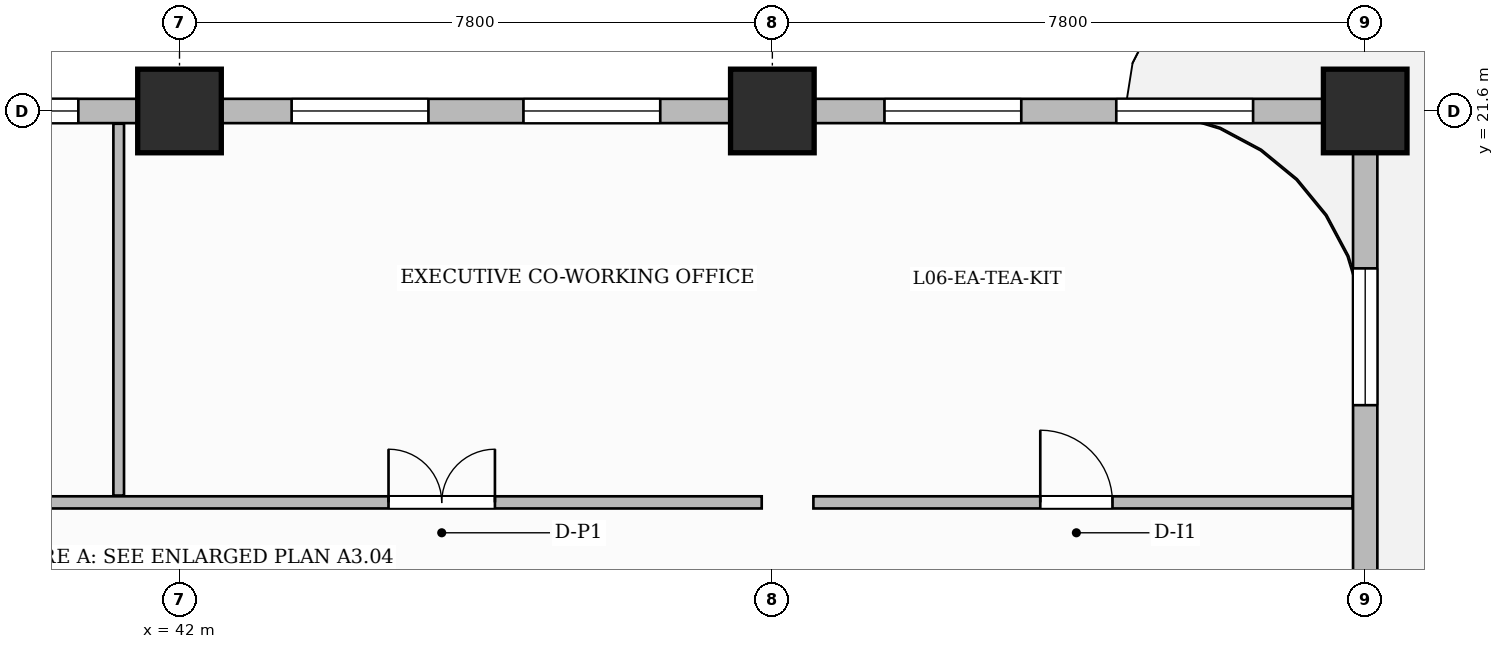
"""IFC4 building model, lengths in metres.
Left out: names, types, materials, properties, quantities, classifications, styles, units other than length and angle.
Written with IfcOpenShell. Run it as: python <this file> out.ifc"""

import sys

from ifc_helpers import new_model, si_unit, direction, frame, frame_2d, origin, origin_2d, place, context, subcontext, project, spatial, rectangle, extrude, source, transform, mapped, element, fill, save


model = new_model("IFC4")
c1 = context("Model", 3, precision=1e-05, world=origin(), true_north=direction((0.0, 1.0)))
c2 = subcontext(c1, "Body", "Model", "MODEL_VIEW")
j1 = project(units=[si_unit("LENGTHUNIT", "METRE"), si_unit("PLANEANGLEUNIT", "RADIAN")], contexts=[c1])
p1 = place(None, origin())
s1 = spatial("IfcSite", under=j1, at=p1, CompositionType="ELEMENT")
p2 = place(p1, origin())
s2 = spatial("IfcBuilding", under=s1, at=p2, CompositionType="ELEMENT")
p3 = place(p2, frame((0.0, 0.0, 32.4)))
s3 = spatial("IfcBuildingStorey", under=s2, at=p3, CompositionType="ELEMENT", Elevation=32.4)
m1 = source(origin(), c2, "Body", "SweptSolid", [
    extrude(rectangle(XDim=1.1, YDim=1.1, at=origin_2d()), origin(), (0.0, 0.0, 1.0), 3.7),
])
for number, where, z_axis, x_axis in (
    (1, (42.0, 21.6, 0.0), (0.0, 0.0, 1.0), (1.0, 0.0, 0.0)),
    (2, (49.8, 21.6, 0.0), (0.0, 0.0, 1.0), (1.0, 0.0, 0.0)),
    (3, (57.6, 21.6, 0.0), (0.0, 0.0, 1.0), (1.0, 0.0, 0.0)),
):
    element("IfcColumn", number, at=place(p3, frame(where, z_axis=z_axis, x_axis=x_axis)), inside=s3, PredefinedType="COLUMN", context=c2, shape_type="MappedRepresentation", body=[
        mapped(m1, transform((0.0, 0.0, 0.0), scale=1.0)),
    ])
p4 = place(p3, frame((30.29, 16.45, 0.0), z_axis=(0.0, 0.0, 1.0), x_axis=(1.0, 0.0, 0.0)))
e4 = element("IfcWall", 4, at=p4, inside=s3, PredefinedType="PARTITIONING", context=c2, shape_type="SweptSolid", body=[
    extrude(rectangle(XDim=19.37, YDim=0.16, at=frame_2d((9.685, 0.0))), origin(), (0.0, 0.0, 1.0), 3.45),
])
p5 = place(p4, frame((1.185, 0.0, 0.0)))
e5 = element("IfcOpeningElement", 5, at=p5, cuts=e4, PredefinedType="OPENING", context=c2, shape_type="SweptSolid", body=[
    extrude(rectangle(XDim=0.85, YDim=2.1, at=frame_2d((0.425, 1.05))), frame((0.0, 0.09, 0.0), z_axis=(0.0, -1.0, 0.0), x_axis=(1.0, 0.0, 0.0)), (0.0, 0.0, 1.0), 0.18),
])
p6 = place(p4, frame((6.66, 0.0, 0.0)))
e6 = element("IfcOpeningElement", 6, at=p6, cuts=e4, PredefinedType="OPENING", context=c2, shape_type="SweptSolid", body=[
    extrude(rectangle(XDim=0.9, YDim=2.15, at=frame_2d((0.45, 1.075))), frame((0.0, 0.09, 0.0), z_axis=(0.0, -1.0, 0.0), x_axis=(1.0, 0.0, 0.0)), (0.0, 0.0, 1.0), 0.18),
])
p7 = place(p4, frame((14.46, 0.0, 0.0)))
e7 = element("IfcOpeningElement", 7, at=p7, cuts=e4, PredefinedType="OPENING", context=c2, shape_type="SweptSolid", body=[
    extrude(rectangle(XDim=1.4, YDim=2.35, at=frame_2d((0.7, 1.175))), frame((0.0, 0.09, 0.0), z_axis=(0.0, -1.0, 0.0), x_axis=(1.0, 0.0, 0.0)), (0.0, 0.0, 1.0), 0.18),
])
p8 = place(p3, frame((50.34, 16.45, 0.0), z_axis=(0.0, 0.0, 1.0), x_axis=(1.0, 0.0, 0.0)))
e8 = element("IfcWall", 8, at=p8, inside=s3, PredefinedType="PARTITIONING", context=c2, shape_type="SweptSolid", body=[
    extrude(rectangle(XDim=7.092, YDim=0.16, at=frame_2d((3.546, 0.0))), origin(), (0.0, 0.0, 1.0), 3.45),
])
p9 = place(p8, frame((2.985, 0.0, 0.0)))
e9 = element("IfcOpeningElement", 9, at=p9, cuts=e8, PredefinedType="OPENING", context=c2, shape_type="SweptSolid", body=[
    extrude(rectangle(XDim=0.95, YDim=2.15, at=frame_2d((0.475, 1.075))), frame((0.0, 0.09, 0.0), z_axis=(0.0, -1.0, 0.0), x_axis=(1.0, 0.0, 0.0)), (0.0, 0.0, 1.0), 0.18),
])
p10 = place(p3, frame((41.2, 16.54, 0.0), z_axis=(0.0, 0.0, 1.0), x_axis=(0.0, 1.0, 0.0)))
e10 = element("IfcWall", 10, at=p10, inside=s3, PredefinedType="PARTITIONING", context=c2, shape_type="SweptSolid", body=[
    extrude(rectangle(XDim=4.892, YDim=0.14, at=frame_2d((2.446, 0.0))), origin(), (0.0, 0.0, 1.0), 3.45),
])
p11 = place(p3, frame((57.6, 0.05, 0.0), z_axis=(0.0, 0.0, 1.0), x_axis=(0.0, 1.0, 0.0)))
e11 = element("IfcWall", 11, at=p11, inside=s3, PredefinedType="SOLIDWALL", context=c2, shape_type="SweptSolid", body=[
    extrude(rectangle(XDim=21.5, YDim=0.32, at=frame_2d((10.75, 0.0))), origin(), (0.0, 0.0, 1.0), 2.885),
])
p12 = place(p11, frame((3.4, 0.0, 0.0)))
e12 = element("IfcOpeningElement", 12, at=p12, cuts=e11, PredefinedType="OPENING", context=c2, shape_type="SweptSolid", body=[
    extrude(rectangle(XDim=1.2, YDim=2.2, at=frame_2d((0.6, 1.1))), frame((0.0, 0.17, 0.0), z_axis=(0.0, -1.0, 0.0), x_axis=(1.0, 0.0, 0.0)), (0.0, 0.0, 1.0), 0.34),
])
p13 = place(p11, frame((1.225, 0.0, 0.8)))
e13 = element("IfcOpeningElement", 13, at=p13, cuts=e11, PredefinedType="OPENING", context=c2, shape_type="SweptSolid", body=[
    extrude(rectangle(XDim=1.4, YDim=1.85, at=frame_2d((0.7, 0.925))), frame((0.0, 0.17, 0.0), z_axis=(0.0, -1.0, 0.0), x_axis=(1.0, 0.0, 0.0)), (0.0, 0.0, 1.0), 0.34),
])
p14 = place(p11, frame((5.15, 0.0, 0.8)))
e14 = element("IfcOpeningElement", 14, at=p14, cuts=e11, PredefinedType="OPENING", context=c2, shape_type="SweptSolid", body=[
    extrude(rectangle(XDim=0.95, YDim=1.75, at=frame_2d((0.475, 0.875))), frame((0.0, 0.17, 0.0), z_axis=(0.0, -1.0, 0.0), x_axis=(1.0, 0.0, 0.0)), (0.0, 0.0, 1.0), 0.34),
])
p15 = place(p11, frame((8.475, 0.0, 0.8)))
e15 = element("IfcOpeningElement", 15, at=p15, cuts=e11, PredefinedType="OPENING", context=c2, shape_type="SweptSolid", body=[
    extrude(rectangle(XDim=1.8, YDim=1.85, at=frame_2d((0.9, 0.925))), frame((0.0, 0.17, 0.0), z_axis=(0.0, -1.0, 0.0), x_axis=(1.0, 0.0, 0.0)), (0.0, 0.0, 1.0), 0.34),
])
p16 = place(p11, frame((11.225, 0.0, 0.8)))
e16 = element("IfcOpeningElement", 16, at=p16, cuts=e11, PredefinedType="OPENING", context=c2, shape_type="SweptSolid", body=[
    extrude(rectangle(XDim=1.8, YDim=1.85, at=frame_2d((0.9, 0.925))), frame((0.0, 0.17, 0.0), z_axis=(0.0, -1.0, 0.0), x_axis=(1.0, 0.0, 0.0)), (0.0, 0.0, 1.0), 0.34),
])
p17 = place(p11, frame((17.679, 0.0, 0.8)))
e17 = element("IfcOpeningElement", 17, at=p17, cuts=e11, PredefinedType="OPENING", context=c2, shape_type="SweptSolid", body=[
    extrude(rectangle(XDim=1.8, YDim=1.85, at=frame_2d((0.9, 0.925))), frame((0.0, 0.17, 0.0), z_axis=(0.0, -1.0, 0.0), x_axis=(1.0, 0.0, 0.0)), (0.0, 0.0, 1.0), 0.34),
])
p18 = place(p3, frame((14.4, 21.6, 0.0), z_axis=(0.0, 0.0, 1.0), x_axis=(1.0, 0.0, 0.0)))
e18 = element("IfcWall", 18, at=p18, inside=s3, PredefinedType="SOLIDWALL", context=c2, shape_type="SweptSolid", body=[
    extrude(rectangle(XDim=43.2, YDim=0.32, at=frame_2d((21.6, 0.0))), origin(), (0.0, 0.0, 1.0), 2.885),
])
p19 = place(p18, frame((1.5, 0.0, 0.0)))
e19 = element("IfcOpeningElement", 19, at=p19, cuts=e18, PredefinedType="OPENING", context=c2, shape_type="SweptSolid", body=[
    extrude(rectangle(XDim=1.2, YDim=2.2, at=frame_2d((0.6, 1.1))), frame((0.0, 0.17, 0.0), z_axis=(0.0, -1.0, 0.0), x_axis=(1.0, 0.0, 0.0)), (0.0, 0.0, 1.0), 0.34),
])
p20 = place(p18, frame((3.336, 0.0, 0.8)))
e20 = element("IfcOpeningElement", 20, at=p20, cuts=e18, PredefinedType="OPENING", context=c2, shape_type="SweptSolid", body=[
    extrude(rectangle(XDim=1.4, YDim=1.85, at=frame_2d((0.7, 0.925))), frame((0.0, 0.17, 0.0), z_axis=(0.0, -1.0, 0.0), x_axis=(1.0, 0.0, 0.0)), (0.0, 0.0, 1.0), 0.34),
])
p21 = place(p18, frame((5.269, 0.0, 0.8)))
e21 = element("IfcOpeningElement", 21, at=p21, cuts=e18, PredefinedType="OPENING", context=c2, shape_type="SweptSolid", body=[
    extrude(rectangle(XDim=0.95, YDim=1.75, at=frame_2d((0.475, 0.875))), frame((0.0, 0.17, 0.0), z_axis=(0.0, -1.0, 0.0), x_axis=(1.0, 0.0, 0.0)), (0.0, 0.0, 1.0), 0.34),
])
p22 = place(p18, frame((8.525, 0.0, 0.8)))
e22 = element("IfcOpeningElement", 22, at=p22, cuts=e18, PredefinedType="OPENING", context=c2, shape_type="SweptSolid", body=[
    extrude(rectangle(XDim=1.8, YDim=1.85, at=frame_2d((0.9, 0.925))), frame((0.0, 0.17, 0.0), z_axis=(0.0, -1.0, 0.0), x_axis=(1.0, 0.0, 0.0)), (0.0, 0.0, 1.0), 0.34),
])
p23 = place(p18, frame((11.275, 0.0, 0.8)))
e23 = element("IfcOpeningElement", 23, at=p23, cuts=e18, PredefinedType="OPENING", context=c2, shape_type="SweptSolid", body=[
    extrude(rectangle(XDim=1.8, YDim=1.85, at=frame_2d((0.9, 0.925))), frame((0.0, 0.17, 0.0), z_axis=(0.0, -1.0, 0.0), x_axis=(1.0, 0.0, 0.0)), (0.0, 0.0, 1.0), 0.34),
])
p24 = place(p18, frame((16.601, 0.0, 0.8)))
e24 = element("IfcOpeningElement", 24, at=p24, cuts=e18, PredefinedType="OPENING", context=c2, shape_type="SweptSolid", body=[
    extrude(rectangle(XDim=1.8, YDim=1.85, at=frame_2d((0.9, 0.925))), frame((0.0, 0.17, 0.0), z_axis=(0.0, -1.0, 0.0), x_axis=(1.0, 0.0, 0.0)), (0.0, 0.0, 1.0), 0.34),
])
p25 = place(p18, frame((21.723, 0.0, 0.8)))
e25 = element("IfcOpeningElement", 25, at=p25, cuts=e18, PredefinedType="OPENING", context=c2, shape_type="SweptSolid", body=[
    extrude(rectangle(XDim=1.8, YDim=1.85, at=frame_2d((0.9, 0.925))), frame((0.0, 0.17, 0.0), z_axis=(0.0, -1.0, 0.0), x_axis=(1.0, 0.0, 0.0)), (0.0, 0.0, 1.0), 0.34),
])
p26 = place(p18, frame((24.469, 0.0, 0.8)))
e26 = element("IfcOpeningElement", 26, at=p26, cuts=e18, PredefinedType="OPENING", context=c2, shape_type="SweptSolid", body=[
    extrude(rectangle(XDim=1.8, YDim=1.85, at=frame_2d((0.9, 0.925))), frame((0.0, 0.17, 0.0), z_axis=(0.0, -1.0, 0.0), x_axis=(1.0, 0.0, 0.0)), (0.0, 0.0, 1.0), 0.34),
])
p27 = place(p18, frame((29.075, 0.0, 0.8)))
e27 = element("IfcOpeningElement", 27, at=p27, cuts=e18, PredefinedType="OPENING", context=c2, shape_type="SweptSolid", body=[
    extrude(rectangle(XDim=1.8, YDim=1.85, at=frame_2d((0.9, 0.925))), frame((0.0, 0.17, 0.0), z_axis=(0.0, -1.0, 0.0), x_axis=(1.0, 0.0, 0.0)), (0.0, 0.0, 1.0), 0.34),
])
p28 = place(p18, frame((32.125, 0.0, 0.8)))
e28 = element("IfcOpeningElement", 28, at=p28, cuts=e18, PredefinedType="OPENING", context=c2, shape_type="SweptSolid", body=[
    extrude(rectangle(XDim=1.8, YDim=1.85, at=frame_2d((0.9, 0.925))), frame((0.0, 0.17, 0.0), z_axis=(0.0, -1.0, 0.0), x_axis=(1.0, 0.0, 0.0)), (0.0, 0.0, 1.0), 0.34),
])
p29 = place(p18, frame((36.875, 0.0, 0.8)))
e29 = element("IfcOpeningElement", 29, at=p29, cuts=e18, PredefinedType="OPENING", context=c2, shape_type="SweptSolid", body=[
    extrude(rectangle(XDim=1.8, YDim=1.85, at=frame_2d((0.9, 0.925))), frame((0.0, 0.17, 0.0), z_axis=(0.0, -1.0, 0.0), x_axis=(1.0, 0.0, 0.0)), (0.0, 0.0, 1.0), 0.34),
])
p30 = place(p18, frame((39.925, 0.0, 0.8)))
e30 = element("IfcOpeningElement", 30, at=p30, cuts=e18, PredefinedType="OPENING", context=c2, shape_type="SweptSolid", body=[
    extrude(rectangle(XDim=1.8, YDim=1.85, at=frame_2d((0.9, 0.925))), frame((0.0, 0.17, 0.0), z_axis=(0.0, -1.0, 0.0), x_axis=(1.0, 0.0, 0.0)), (0.0, 0.0, 1.0), 0.34),
])
m2 = source(origin(), c2, "Body", "SweptSolid", [
    extrude(rectangle(XDim=0.95, YDim=2.15, at=frame_2d((0.475, 1.075))), frame((0.0, 0.025, 0.0), z_axis=(0.0, -1.0, 0.0), x_axis=(1.0, 0.0, 0.0)), (0.0, 0.0, 1.0), 0.05),
])
p31 = place(p9, origin())
e31 = element("IfcDoor", 31, at=p31, inside=s3, OperationType="SINGLE_SWING_LEFT", PredefinedType="DOOR", context=c2, shape_type="MappedRepresentation", body=[
    mapped(m2, transform((0.0, 0.0, 0.0), scale=1.0)),
])
fill(e9, e31)
m3 = source(origin(), c2, "Body", "SweptSolid", [
    extrude(rectangle(XDim=1.4, YDim=2.35, at=frame_2d((0.7, 1.175))), frame((0.0, 0.025, 0.0), z_axis=(0.0, -1.0, 0.0), x_axis=(1.0, 0.0, 0.0)), (0.0, 0.0, 1.0), 0.05),
])
p32 = place(p7, origin())
e32 = element("IfcDoor", 32, at=p32, inside=s3, OperationType="DOUBLE_DOOR_SINGLE_SWING", PredefinedType="DOOR", context=c2, shape_type="MappedRepresentation", body=[
    mapped(m3, transform((0.0, 0.0, 0.0), scale=1.0)),
])
fill(e7, e32)
m4 = source(origin(), c2, "Body", "SweptSolid", [
    extrude(rectangle(XDim=1.8, YDim=1.85, at=frame_2d((0.9, 0.925))), frame((0.0, 0.03, 0.0), z_axis=(0.0, -1.0, 0.0), x_axis=(1.0, 0.0, 0.0)), (0.0, 0.0, 1.0), 0.06),
])
p33 = place(p17, origin())
e33 = element("IfcWindow", 33, at=p33, inside=s3, PartitioningType="DOUBLE_PANEL_VERTICAL", PredefinedType="WINDOW", context=c2, shape_type="MappedRepresentation", body=[
    mapped(m4, transform((0.0, 0.0, 0.0), scale=1.0)),
])
fill(e17, e33)
p34 = place(p26, origin())
e34 = element("IfcWindow", 34, at=p34, inside=s3, PartitioningType="DOUBLE_PANEL_VERTICAL", PredefinedType="WINDOW", context=c2, shape_type="MappedRepresentation", body=[
    mapped(m4, transform((0.0, 0.0, 0.0), scale=1.0)),
])
fill(e26, e34)
p35 = place(p27, origin())
e35 = element("IfcWindow", 35, at=p35, inside=s3, PartitioningType="DOUBLE_PANEL_VERTICAL", PredefinedType="WINDOW", context=c2, shape_type="MappedRepresentation", body=[
    mapped(m4, transform((0.0, 0.0, 0.0), scale=1.0)),
])
fill(e27, e35)
p36 = place(p28, origin())
e36 = element("IfcWindow", 36, at=p36, inside=s3, PartitioningType="DOUBLE_PANEL_VERTICAL", PredefinedType="WINDOW", context=c2, shape_type="MappedRepresentation", body=[
    mapped(m4, transform((0.0, 0.0, 0.0), scale=1.0)),
])
fill(e28, e36)
p37 = place(p29, origin())
e37 = element("IfcWindow", 37, at=p37, inside=s3, PartitioningType="DOUBLE_PANEL_VERTICAL", PredefinedType="WINDOW", context=c2, shape_type="MappedRepresentation", body=[
    mapped(m4, transform((0.0, 0.0, 0.0), scale=1.0)),
])
fill(e29, e37)
p38 = place(p30, origin())
e38 = element("IfcWindow", 38, at=p38, inside=s3, PartitioningType="DOUBLE_PANEL_VERTICAL", PredefinedType="WINDOW", context=c2, shape_type="MappedRepresentation", body=[
    mapped(m4, transform((0.0, 0.0, 0.0), scale=1.0)),
])
fill(e30, e38)
save(model, sys.argv[1])
